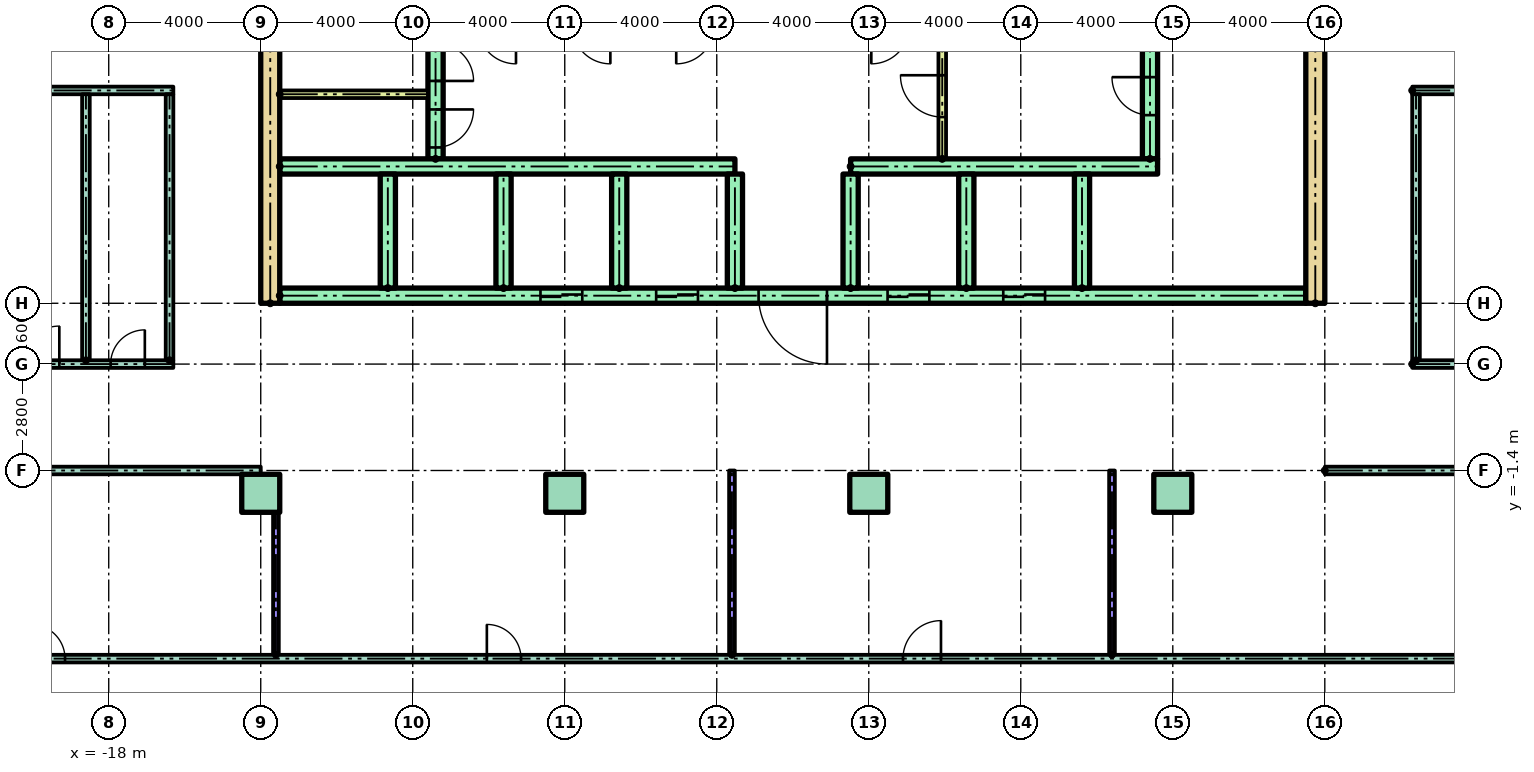
"""IFC4 building model, lengths in metres.
Left out: names, types, materials, properties, quantities, classifications, styles, units other than length and angle.
Written with IfcOpenShell. Run it as: python <this file> out.ifc"""

import sys

from ifc_helpers import new_model, si_unit, direction, frame, frame_2d, origin, origin_2d, place, context, subcontext, project, spatial, rectangle, extrude, element, fill, save


model = new_model("IFC4")
c1 = context("Model", 3, precision=1e-05, world=origin(), true_north=direction((0.0, 1.0)))
c2 = subcontext(c1, "Body", "Model", "MODEL_VIEW")
j1 = project(units=[si_unit("LENGTHUNIT", "METRE"), si_unit("PLANEANGLEUNIT", "RADIAN")], contexts=[c1])
p1 = place(None, origin())
s1 = spatial("IfcSite", under=j1, at=p1, CompositionType="ELEMENT")
p2 = place(p1, origin())
s2 = spatial("IfcBuilding", under=s1, at=p2, CompositionType="ELEMENT")
p3 = place(p2, frame((0.0, 0.0, 22.0)))
s3 = spatial("IfcBuildingStorey", under=s2, at=p3, CompositionType="ELEMENT", Elevation=22.0)
for number, where in (
    (1, (-14.0, -2.0, 0.0)),
    (2, (-6.0, -2.0, 0.0)),
    (3, (2.0, -2.0, 0.0)),
    (4, (10.0, -2.0, 0.0)),
):
    element("IfcColumn", number, at=place(p3, frame(where)), inside=s3, PredefinedType="COLUMN", context=c2, shape_type="SweptSolid", body=[
        extrude(rectangle(XDim=1.0, YDim=1.0, at=origin_2d()), origin(), (0.0, 0.0, 1.0), 4.0),
    ])
for number, where, z_axis, x_axis in (
    (5, (-13.75, 3.0, 0.0), (0.0, 0.0, 1.0), (0.0, 1.0, 0.0)),
    (6, (13.75, 3.0, 0.0), (0.0, 0.0, 1.0), (0.0, 1.0, 0.0)),
):
    element("IfcWall", number, at=place(p3, frame(where, z_axis=z_axis, x_axis=x_axis)), inside=s3, PredefinedType="SHEAR", context=c2, shape_type="SweptSolid", body=[
        extrude(rectangle(XDim=17.0, YDim=0.5, at=frame_2d((8.5, 0.0))), origin(), (0.0, 0.0, 1.0), 3.2),
    ])
p4 = place(p3, frame((-9.4, 6.8, 0.0), z_axis=(0.0, 0.0, 1.0), x_axis=(0.0, 1.0, 0.0)))
e7 = element("IfcWall", 7, at=p4, inside=s3, PredefinedType="SHEAR", context=c2, shape_type="SweptSolid", body=[
    extrude(rectangle(XDim=12.7, YDim=0.4, at=frame_2d((6.35, 0.0))), origin(), (0.0, 0.0, 1.0), 3.2),
])
p5 = place(p4, frame((0.3, 0.0, 0.0)))
e8 = element("IfcOpeningElement", 8, at=p5, cuts=e7, PredefinedType="OPENING", context=c2, shape_type="SweptSolid", body=[
    extrude(rectangle(XDim=1.0, YDim=2.1, at=frame_2d((0.5, 1.05))), frame((0.0, 0.21, 0.0), z_axis=(0.0, -1.0, 0.0), x_axis=(1.0, 0.0, 0.0)), (0.0, 0.0, 1.0), 0.42),
])
p6 = place(p4, frame((2.05, 0.0, 0.0)))
e9 = element("IfcOpeningElement", 9, at=p6, cuts=e7, PredefinedType="OPENING", context=c2, shape_type="SweptSolid", body=[
    extrude(rectangle(XDim=1.0, YDim=2.1, at=frame_2d((0.5, 1.05))), frame((0.0, 0.21, 0.0), z_axis=(0.0, -1.0, 0.0), x_axis=(1.0, 0.0, 0.0)), (0.0, 0.0, 1.0), 0.42),
])
p7 = place(p4, frame((7.925, 0.0, 0.0)))
e10 = element("IfcOpeningElement", 10, at=p7, cuts=e7, PredefinedType="OPENING", context=c2, shape_type="SweptSolid", body=[
    extrude(rectangle(XDim=1.0, YDim=2.1, at=frame_2d((0.5, 1.05))), frame((0.0, 0.21, 0.0), z_axis=(0.0, -1.0, 0.0), x_axis=(1.0, 0.0, 0.0)), (0.0, 0.0, 1.0), 0.42),
])
p8 = place(p3, frame((9.4, 6.8, 0.0), z_axis=(0.0, 0.0, 1.0), x_axis=(0.0, 1.0, 0.0)))
e11 = element("IfcWall", 11, at=p8, inside=s3, PredefinedType="SHEAR", context=c2, shape_type="SweptSolid", body=[
    extrude(rectangle(XDim=12.7, YDim=0.4, at=frame_2d((6.35, 0.0))), origin(), (0.0, 0.0, 1.0), 3.2),
])
p9 = place(p8, frame((1.15, 0.0, 0.0)))
e12 = element("IfcOpeningElement", 12, at=p9, cuts=e11, PredefinedType="OPENING", context=c2, shape_type="SweptSolid", body=[
    extrude(rectangle(XDim=1.0, YDim=2.1, at=frame_2d((0.5, 1.05))), frame((0.0, 0.21, 0.0), z_axis=(0.0, -1.0, 0.0), x_axis=(1.0, 0.0, 0.0)), (0.0, 0.0, 1.0), 0.42),
])
p10 = place(p8, frame((7.925, 0.0, 0.0)))
e13 = element("IfcOpeningElement", 13, at=p10, cuts=e11, PredefinedType="OPENING", context=c2, shape_type="SweptSolid", body=[
    extrude(rectangle(XDim=1.0, YDim=2.1, at=frame_2d((0.5, 1.05))), frame((0.0, 0.21, 0.0), z_axis=(0.0, -1.0, 0.0), x_axis=(1.0, 0.0, 0.0)), (0.0, 0.0, 1.0), 0.42),
])
p11 = place(p3, frame((-13.5, 3.2, 0.0)))
e14 = element("IfcWall", 14, at=p11, inside=s3, PredefinedType="SHEAR", context=c2, shape_type="SweptSolid", body=[
    extrude(rectangle(XDim=27.0, YDim=0.4, at=frame_2d((13.5, 0.0))), origin(), (0.0, 0.0, 1.0), 3.2),
])
p12 = place(p11, frame((6.861, 0.0, 0.0)))
e15 = element("IfcOpeningElement", 15, at=p12, cuts=e14, PredefinedType="OPENING", context=c2, shape_type="SweptSolid", body=[
    extrude(rectangle(XDim=1.1, YDim=2.1, at=frame_2d((0.55, 1.05))), frame((0.0, 0.21, 0.0), z_axis=(0.0, -1.0, 0.0), x_axis=(1.0, 0.0, 0.0)), (0.0, 0.0, 1.0), 0.42),
])
p13 = place(p11, frame((9.906, 0.0, 0.0)))
e16 = element("IfcOpeningElement", 16, at=p13, cuts=e14, PredefinedType="OPENING", context=c2, shape_type="SweptSolid", body=[
    extrude(rectangle(XDim=1.1, YDim=2.1, at=frame_2d((0.55, 1.05))), frame((0.0, 0.21, 0.0), z_axis=(0.0, -1.0, 0.0), x_axis=(1.0, 0.0, 0.0)), (0.0, 0.0, 1.0), 0.42),
])
p14 = place(p11, frame((15.994, 0.0, 0.0)))
e17 = element("IfcOpeningElement", 17, at=p14, cuts=e14, PredefinedType="OPENING", context=c2, shape_type="SweptSolid", body=[
    extrude(rectangle(XDim=1.1, YDim=2.1, at=frame_2d((0.55, 1.05))), frame((0.0, 0.21, 0.0), z_axis=(0.0, -1.0, 0.0), x_axis=(1.0, 0.0, 0.0)), (0.0, 0.0, 1.0), 0.42),
])
p15 = place(p11, frame((19.039, 0.0, 0.0)))
e18 = element("IfcOpeningElement", 18, at=p15, cuts=e14, PredefinedType="OPENING", context=c2, shape_type="SweptSolid", body=[
    extrude(rectangle(XDim=1.1, YDim=2.1, at=frame_2d((0.55, 1.05))), frame((0.0, 0.21, 0.0), z_axis=(0.0, -1.0, 0.0), x_axis=(1.0, 0.0, 0.0)), (0.0, 0.0, 1.0), 0.42),
])
p16 = place(p11, frame((12.6, 0.0, 0.0)))
e19 = element("IfcOpeningElement", 19, at=p16, cuts=e14, PredefinedType="OPENING", context=c2, shape_type="SweptSolid", body=[
    extrude(rectangle(XDim=1.8, YDim=2.1, at=frame_2d((0.9, 1.05))), frame((0.0, 0.21, 0.0), z_axis=(0.0, -1.0, 0.0), x_axis=(1.0, 0.0, 0.0)), (0.0, 0.0, 1.0), 0.42),
])
p17 = place(p3, frame((-13.5, 6.6, 0.0)))
e20 = element("IfcWall", 20, at=p17, inside=s3, PredefinedType="SHEAR", context=c2, shape_type="SweptSolid", body=[
    extrude(rectangle(XDim=11.978, YDim=0.4, at=frame_2d((5.989, 0.0))), origin(), (0.0, 0.0, 1.0), 3.2),
])
p18 = place(p3, frame((1.522, 6.6, 0.0)))
e21 = element("IfcWall", 21, at=p18, inside=s3, PredefinedType="SHEAR", context=c2, shape_type="SweptSolid", body=[
    extrude(rectangle(XDim=8.078, YDim=0.4, at=frame_2d((4.039, 0.0))), origin(), (0.0, 0.0, 1.0), 3.2),
])
for number, where, z_axis, x_axis in (
    (22, (-10.656, 3.4, 0.0), (0.0, 0.0, 1.0), (0.0, 1.0, 0.0)),
    (23, (-7.611, 3.4, 0.0), (0.0, 0.0, 1.0), (0.0, 1.0, 0.0)),
    (24, (-4.567, 3.4, 0.0), (0.0, 0.0, 1.0), (0.0, 1.0, 0.0)),
    (25, (-1.522, 3.4, 0.0), (0.0, 0.0, 1.0), (0.0, 1.0, 0.0)),
    (26, (1.522, 3.4, 0.0), (0.0, 0.0, 1.0), (0.0, 1.0, 0.0)),
    (27, (4.567, 3.4, 0.0), (0.0, 0.0, 1.0), (0.0, 1.0, 0.0)),
    (28, (7.611, 3.4, 0.0), (0.0, 0.0, 1.0), (0.0, 1.0, 0.0)),
):
    element("IfcWall", number, at=place(p3, frame(where, z_axis=z_axis, x_axis=x_axis)), inside=s3, PredefinedType="SHEAR", context=c2, shape_type="SweptSolid", body=[
        extrude(rectangle(XDim=3.0, YDim=0.4, at=frame_2d((1.5, 0.0))), origin(), (0.0, 0.0, 1.0), 3.2),
    ])
p19 = place(p3, frame((3.933, 6.8, 0.0), z_axis=(0.0, 0.0, 1.0), x_axis=(0.0, 1.0, 0.0)))
e29 = element("IfcWall", 29, at=p19, inside=s3, PredefinedType="PARTITIONING", context=c2, shape_type="SweptSolid", body=[
    extrude(rectangle(XDim=3.3, YDim=0.2, at=frame_2d((1.65, 0.0))), origin(), (0.0, 0.0, 1.0), 3.2),
])
p20 = place(p19, frame((1.1, 0.0, 0.0)))
e30 = element("IfcOpeningElement", 30, at=p20, cuts=e29, PredefinedType="OPENING", context=c2, shape_type="SweptSolid", body=[
    extrude(rectangle(XDim=1.1, YDim=2.1, at=frame_2d((0.55, 1.05))), frame((0.0, 0.11, 0.0), z_axis=(0.0, -1.0, 0.0), x_axis=(1.0, 0.0, 0.0)), (0.0, 0.0, 1.0), 0.22),
])
p21 = place(p3, frame((-13.5, 8.5, 0.0)))
e31 = element("IfcWall", 31, at=p21, inside=s3, PredefinedType="PARTITIONING", context=c2, shape_type="SweptSolid", body=[
    extrude(rectangle(XDim=3.9, YDim=0.2, at=frame_2d((1.95, 0.0))), origin(), (0.0, 0.0, 1.0), 3.2),
])
p22 = place(p3, frame((-37.6, -6.35, 0.0)))
e32 = element("IfcWall", 32, at=p22, inside=s3, PredefinedType="PARTITIONING", context=c2, shape_type="SweptSolid", body=[
    extrude(rectangle(XDim=75.2, YDim=0.2, at=frame_2d((37.6, 0.0))), origin(), (0.0, 0.0, 1.0), 3.2),
])
p23 = place(p22, frame((5.5, 0.0, 0.0)))
e33 = element("IfcOpeningElement", 33, at=p23, cuts=e32, PredefinedType="OPENING", context=c2, shape_type="SweptSolid", body=[
    extrude(rectangle(XDim=1.0, YDim=2.1, at=frame_2d((0.5, 1.05))), frame((0.0, 0.11, 0.0), z_axis=(0.0, -1.0, 0.0), x_axis=(1.0, 0.0, 0.0)), (0.0, 0.0, 1.0), 0.22),
])
p24 = place(p22, frame((17.55, 0.0, 0.0)))
e34 = element("IfcOpeningElement", 34, at=p24, cuts=e32, PredefinedType="OPENING", context=c2, shape_type="SweptSolid", body=[
    extrude(rectangle(XDim=0.9, YDim=2.1, at=frame_2d((0.45, 1.05))), frame((0.0, 0.11, 0.0), z_axis=(0.0, -1.0, 0.0), x_axis=(1.0, 0.0, 0.0)), (0.0, 0.0, 1.0), 0.22),
])
p25 = place(p22, frame((29.55, 0.0, 0.0)))
e35 = element("IfcOpeningElement", 35, at=p25, cuts=e32, PredefinedType="OPENING", context=c2, shape_type="SweptSolid", body=[
    extrude(rectangle(XDim=0.9, YDim=2.1, at=frame_2d((0.45, 1.05))), frame((0.0, 0.11, 0.0), z_axis=(0.0, -1.0, 0.0), x_axis=(1.0, 0.0, 0.0)), (0.0, 0.0, 1.0), 0.22),
])
p26 = place(p22, frame((40.5, 0.0, 0.0)))
e36 = element("IfcOpeningElement", 36, at=p26, cuts=e32, PredefinedType="OPENING", context=c2, shape_type="SweptSolid", body=[
    extrude(rectangle(XDim=1.0, YDim=2.1, at=frame_2d((0.5, 1.05))), frame((0.0, 0.11, 0.0), z_axis=(0.0, -1.0, 0.0), x_axis=(1.0, 0.0, 0.0)), (0.0, 0.0, 1.0), 0.22),
])
p27 = place(p22, frame((60.1, 0.0, 0.0)))
e37 = element("IfcOpeningElement", 37, at=p27, cuts=e32, PredefinedType="OPENING", context=c2, shape_type="SweptSolid", body=[
    extrude(rectangle(XDim=1.0, YDim=2.1, at=frame_2d((0.5, 1.05))), frame((0.0, 0.11, 0.0), z_axis=(0.0, -1.0, 0.0), x_axis=(1.0, 0.0, 0.0)), (0.0, 0.0, 1.0), 0.22),
])
for number, where in (
    (38, (-36.9, -1.4, 0.0)),
    (39, (14.0, -1.4, 0.0)),
):
    element("IfcWall", number, at=place(p3, frame(where)), inside=s3, PredefinedType="PARTITIONING", context=c2, shape_type="SweptSolid", body=[
        extrude(rectangle(XDim=22.9, YDim=0.2, at=frame_2d((11.45, 0.0))), origin(), (0.0, 0.0, 1.0), 3.2),
    ])
p28 = place(p3, frame((-36.9, 1.4, 0.0)))
e40 = element("IfcWall", 40, at=p28, inside=s3, PredefinedType="PARTITIONING", context=c2, shape_type="SweptSolid", body=[
    extrude(rectangle(XDim=20.6, YDim=0.2, at=frame_2d((10.3, 0.0))), origin(), (0.0, 0.0, 1.0), 3.2),
])
p29 = place(p28, frame((7.9, 0.0, 0.0)))
e41 = element("IfcOpeningElement", 41, at=p29, cuts=e40, PredefinedType="OPENING", context=c2, shape_type="SweptSolid", body=[
    extrude(rectangle(XDim=1.0, YDim=2.1, at=frame_2d((0.5, 1.05))), frame((0.0, 0.11, 0.0), z_axis=(0.0, -1.0, 0.0), x_axis=(1.0, 0.0, 0.0)), (0.0, 0.0, 1.0), 0.22),
])
p30 = place(p28, frame((12.9, 0.0, 0.0)))
e42 = element("IfcOpeningElement", 42, at=p30, cuts=e40, PredefinedType="OPENING", context=c2, shape_type="SweptSolid", body=[
    extrude(rectangle(XDim=1.0, YDim=2.1, at=frame_2d((0.5, 1.05))), frame((0.0, 0.11, 0.0), z_axis=(0.0, -1.0, 0.0), x_axis=(1.0, 0.0, 0.0)), (0.0, 0.0, 1.0), 0.22),
])
p31 = place(p28, frame((16.6, 0.0, 0.0)))
e43 = element("IfcOpeningElement", 43, at=p31, cuts=e40, PredefinedType="OPENING", context=c2, shape_type="SweptSolid", body=[
    extrude(rectangle(XDim=1.0, YDim=2.1, at=frame_2d((0.5, 1.05))), frame((0.0, 0.11, 0.0), z_axis=(0.0, -1.0, 0.0), x_axis=(1.0, 0.0, 0.0)), (0.0, 0.0, 1.0), 0.22),
])
p32 = place(p28, frame((18.95, 0.0, 0.0)))
e44 = element("IfcOpeningElement", 44, at=p32, cuts=e40, PredefinedType="OPENING", context=c2, shape_type="SweptSolid", body=[
    extrude(rectangle(XDim=0.9, YDim=2.1, at=frame_2d((0.45, 1.05))), frame((0.0, 0.11, 0.0), z_axis=(0.0, -1.0, 0.0), x_axis=(1.0, 0.0, 0.0)), (0.0, 0.0, 1.0), 0.22),
])
p33 = place(p3, frame((16.3, 1.4, 0.0)))
e45 = element("IfcWall", 45, at=p33, inside=s3, PredefinedType="PARTITIONING", context=c2, shape_type="SweptSolid", body=[
    extrude(rectangle(XDim=20.6, YDim=0.2, at=frame_2d((10.3, 0.0))), origin(), (0.0, 0.0, 1.0), 3.2),
])
p34 = place(p33, frame((2.35, 0.0, 0.0)))
e46 = element("IfcOpeningElement", 46, at=p34, cuts=e45, PredefinedType="OPENING", context=c2, shape_type="SweptSolid", body=[
    extrude(rectangle(XDim=1.0, YDim=2.1, at=frame_2d((0.5, 1.05))), frame((0.0, 0.11, 0.0), z_axis=(0.0, -1.0, 0.0), x_axis=(1.0, 0.0, 0.0)), (0.0, 0.0, 1.0), 0.22),
])
p35 = place(p33, frame((7.1, 0.0, 0.0)))
e47 = element("IfcOpeningElement", 47, at=p35, cuts=e45, PredefinedType="OPENING", context=c2, shape_type="SweptSolid", body=[
    extrude(rectangle(XDim=1.0, YDim=2.1, at=frame_2d((0.5, 1.05))), frame((0.0, 0.11, 0.0), z_axis=(0.0, -1.0, 0.0), x_axis=(1.0, 0.0, 0.0)), (0.0, 0.0, 1.0), 0.22),
])
p36 = place(p33, frame((10.8, 0.0, 0.0)))
e48 = element("IfcOpeningElement", 48, at=p36, cuts=e45, PredefinedType="OPENING", context=c2, shape_type="SweptSolid", body=[
    extrude(rectangle(XDim=1.0, YDim=2.1, at=frame_2d((0.5, 1.05))), frame((0.0, 0.11, 0.0), z_axis=(0.0, -1.0, 0.0), x_axis=(1.0, 0.0, 0.0)), (0.0, 0.0, 1.0), 0.22),
])
p37 = place(p33, frame((13.15, 0.0, 0.0)))
e49 = element("IfcOpeningElement", 49, at=p37, cuts=e45, PredefinedType="OPENING", context=c2, shape_type="SweptSolid", body=[
    extrude(rectangle(XDim=0.9, YDim=2.1, at=frame_2d((0.45, 1.05))), frame((0.0, 0.11, 0.0), z_axis=(0.0, -1.0, 0.0), x_axis=(1.0, 0.0, 0.0)), (0.0, 0.0, 1.0), 0.22),
])
for number, where in (
    (50, (-37.6, 8.6, 0.0)),
    (51, (16.3, 8.6, 0.0)),
):
    element("IfcWall", number, at=place(p3, frame(where)), inside=s3, PredefinedType="PARTITIONING", context=c2, shape_type="SweptSolid", body=[
        extrude(rectangle(XDim=21.3, YDim=0.2, at=frame_2d((10.65, 0.0))), origin(), (0.0, 0.0, 1.0), 3.2),
    ])
for number, where, z_axis, x_axis in (
    (52, (-18.6, 1.5, 0.0), (0.0, 0.0, 1.0), (0.0, 1.0, 0.0)),
    (53, (-16.4, 1.5, 0.0), (0.0, 0.0, 1.0), (0.0, 1.0, 0.0)),
):
    element("IfcWall", number, at=place(p3, frame(where, z_axis=z_axis, x_axis=x_axis)), inside=s3, PredefinedType="PARTITIONING", context=c2, shape_type="SweptSolid", body=[
        extrude(rectangle(XDim=7.0, YDim=0.2, at=frame_2d((3.5, 0.0))), origin(), (0.0, 0.0, 1.0), 3.2),
    ])
p38 = place(p3, frame((-13.6, -6.25, 0.0), z_axis=(0.0, 0.0, 1.0), x_axis=(0.0, 1.0, 0.0)))
e54 = element("IfcWall", 54, at=p38, inside=s3, PredefinedType="PARTITIONING", context=c2, shape_type="SweptSolid", body=[
    extrude(rectangle(XDim=3.75, YDim=0.15, at=frame_2d((1.875, 0.0))), origin(), (0.0, 0.0, 1.0), 3.2),
])
for number, where, z_axis, x_axis in (
    (55, (-1.6, -6.25, 0.0), (0.0, 0.0, 1.0), (0.0, 1.0, 0.0)),
    (56, (8.4, -6.25, 0.0), (0.0, 0.0, 1.0), (0.0, 1.0, 0.0)),
):
    element("IfcWall", number, at=place(p3, frame(where, z_axis=z_axis, x_axis=x_axis)), inside=s3, PredefinedType="PARTITIONING", context=c2, shape_type="SweptSolid", body=[
        extrude(rectangle(XDim=4.85, YDim=0.15, at=frame_2d((2.425, 0.0))), origin(), (0.0, 0.0, 1.0), 3.2),
    ])
p39 = place(p3, frame((16.4, 1.5, 0.0), z_axis=(0.0, 0.0, 1.0), x_axis=(0.0, 1.0, 0.0)))
e57 = element("IfcWall", 57, at=p39, inside=s3, PredefinedType="PARTITIONING", context=c2, shape_type="SweptSolid", body=[
    extrude(rectangle(XDim=7.0, YDim=0.2, at=frame_2d((3.5, 0.0))), origin(), (0.0, 0.0, 1.0), 3.2),
])
p40 = place(p12, origin())
e58 = element("IfcDoor", 58, at=p40, inside=s3, OperationType="SLIDING_TO_LEFT", PredefinedType="DOOR", context=c2, shape_type="SweptSolid", body=[
    extrude(rectangle(XDim=1.1, YDim=2.1, at=frame_2d((0.55, 1.05))), frame((0.0, 0.025, 0.0), z_axis=(0.0, -1.0, 0.0), x_axis=(1.0, 0.0, 0.0)), (0.0, 0.0, 1.0), 0.05),
])
fill(e15, e58)
p41 = place(p13, origin())
e59 = element("IfcDoor", 59, at=p41, inside=s3, OperationType="SLIDING_TO_LEFT", PredefinedType="DOOR", context=c2, shape_type="SweptSolid", body=[
    extrude(rectangle(XDim=1.1, YDim=2.1, at=frame_2d((0.55, 1.05))), frame((0.0, 0.025, 0.0), z_axis=(0.0, -1.0, 0.0), x_axis=(1.0, 0.0, 0.0)), (0.0, 0.0, 1.0), 0.05),
])
fill(e16, e59)
p42 = place(p14, origin())
e60 = element("IfcDoor", 60, at=p42, inside=s3, OperationType="SLIDING_TO_LEFT", PredefinedType="DOOR", context=c2, shape_type="SweptSolid", body=[
    extrude(rectangle(XDim=1.1, YDim=2.1, at=frame_2d((0.55, 1.05))), frame((0.0, 0.025, 0.0), z_axis=(0.0, -1.0, 0.0), x_axis=(1.0, 0.0, 0.0)), (0.0, 0.0, 1.0), 0.05),
])
fill(e17, e60)
p43 = place(p15, origin())
e61 = element("IfcDoor", 61, at=p43, inside=s3, OperationType="SLIDING_TO_LEFT", PredefinedType="DOOR", context=c2, shape_type="SweptSolid", body=[
    extrude(rectangle(XDim=1.1, YDim=2.1, at=frame_2d((0.55, 1.05))), frame((0.0, 0.025, 0.0), z_axis=(0.0, -1.0, 0.0), x_axis=(1.0, 0.0, 0.0)), (0.0, 0.0, 1.0), 0.05),
])
fill(e18, e61)
p44 = place(p16, frame((1.8, 0.0, 0.0), z_axis=(0.0, 0.0, 1.0), x_axis=(-1.0, 0.0, 0.0)))
e62 = element("IfcDoor", 62, at=p44, inside=s3, OperationType="DOUBLE_DOOR_SINGLE_SWING", PredefinedType="DOOR", context=c2, shape_type="SweptSolid", body=[
    extrude(rectangle(XDim=1.8, YDim=2.1, at=frame_2d((0.9, 1.05))), frame((0.0, 0.025, 0.0), z_axis=(0.0, -1.0, 0.0), x_axis=(1.0, 0.0, 0.0)), (0.0, 0.0, 1.0), 0.05),
])
fill(e19, e62)
p45 = place(p20, origin())
e63 = element("IfcDoor", 63, at=p45, inside=s3, OperationType="SINGLE_SWING_RIGHT", PredefinedType="DOOR", context=c2, shape_type="SweptSolid", body=[
    extrude(rectangle(XDim=1.1, YDim=2.1, at=frame_2d((0.55, 1.05))), frame((0.0, 0.025, 0.0), z_axis=(0.0, -1.0, 0.0), x_axis=(1.0, 0.0, 0.0)), (0.0, 0.0, 1.0), 0.05),
])
fill(e30, e63)
p46 = place(p5, frame((1.0, 0.0, 0.0), z_axis=(0.0, 0.0, 1.0), x_axis=(-1.0, 0.0, 0.0)))
e64 = element("IfcDoor", 64, at=p46, inside=s3, OperationType="SINGLE_SWING_RIGHT", PredefinedType="DOOR", context=c2, shape_type="SweptSolid", body=[
    extrude(rectangle(XDim=1.0, YDim=2.1, at=frame_2d((0.5, 1.05))), frame((0.0, 0.025, 0.0), z_axis=(0.0, -1.0, 0.0), x_axis=(1.0, 0.0, 0.0)), (0.0, 0.0, 1.0), 0.05),
])
fill(e8, e64)
p47 = place(p6, frame((1.0, 0.0, 0.0), z_axis=(0.0, 0.0, 1.0), x_axis=(-1.0, 0.0, 0.0)))
e65 = element("IfcDoor", 65, at=p47, inside=s3, OperationType="SINGLE_SWING_LEFT", PredefinedType="DOOR", context=c2, shape_type="SweptSolid", body=[
    extrude(rectangle(XDim=1.0, YDim=2.1, at=frame_2d((0.5, 1.05))), frame((0.0, 0.025, 0.0), z_axis=(0.0, -1.0, 0.0), x_axis=(1.0, 0.0, 0.0)), (0.0, 0.0, 1.0), 0.05),
])
fill(e9, e65)
p48 = place(p9, origin())
e66 = element("IfcDoor", 66, at=p48, inside=s3, OperationType="SINGLE_SWING_RIGHT", PredefinedType="DOOR", context=c2, shape_type="SweptSolid", body=[
    extrude(rectangle(XDim=1.0, YDim=2.1, at=frame_2d((0.5, 1.05))), frame((0.0, 0.025, 0.0), z_axis=(0.0, -1.0, 0.0), x_axis=(1.0, 0.0, 0.0)), (0.0, 0.0, 1.0), 0.05),
])
fill(e12, e66)
p49 = place(p24, origin())
e67 = element("IfcDoor", 67, at=p49, inside=s3, OperationType="SINGLE_SWING_LEFT", PredefinedType="DOOR", context=c2, shape_type="SweptSolid", body=[
    extrude(rectangle(XDim=0.9, YDim=2.1, at=frame_2d((0.45, 1.05))), frame((0.0, 0.025, 0.0), z_axis=(0.0, -1.0, 0.0), x_axis=(1.0, 0.0, 0.0)), (0.0, 0.0, 1.0), 0.05),
])
fill(e34, e67)
p50 = place(p25, origin())
e68 = element("IfcDoor", 68, at=p50, inside=s3, OperationType="SINGLE_SWING_LEFT", PredefinedType="DOOR", context=c2, shape_type="SweptSolid", body=[
    extrude(rectangle(XDim=0.9, YDim=2.1, at=frame_2d((0.45, 1.05))), frame((0.0, 0.025, 0.0), z_axis=(0.0, -1.0, 0.0), x_axis=(1.0, 0.0, 0.0)), (0.0, 0.0, 1.0), 0.05),
])
fill(e35, e68)
p51 = place(p26, origin())
e69 = element("IfcDoor", 69, at=p51, inside=s3, OperationType="SINGLE_SWING_RIGHT", PredefinedType="DOOR", context=c2, shape_type="SweptSolid", body=[
    extrude(rectangle(XDim=1.0, YDim=2.1, at=frame_2d((0.5, 1.05))), frame((0.0, 0.025, 0.0), z_axis=(0.0, -1.0, 0.0), x_axis=(1.0, 0.0, 0.0)), (0.0, 0.0, 1.0), 0.05),
])
fill(e36, e69)
p52 = place(p31, origin())
e70 = element("IfcDoor", 70, at=p52, inside=s3, OperationType="SINGLE_SWING_RIGHT", PredefinedType="DOOR", context=c2, shape_type="SweptSolid", body=[
    extrude(rectangle(XDim=1.0, YDim=2.1, at=frame_2d((0.5, 1.05))), frame((0.0, 0.025, 0.0), z_axis=(0.0, -1.0, 0.0), x_axis=(1.0, 0.0, 0.0)), (0.0, 0.0, 1.0), 0.05),
])
fill(e43, e70)
p53 = place(p32, origin())
e71 = element("IfcDoor", 71, at=p53, inside=s3, OperationType="SINGLE_SWING_RIGHT", PredefinedType="DOOR", context=c2, shape_type="SweptSolid", body=[
    extrude(rectangle(XDim=0.9, YDim=2.1, at=frame_2d((0.45, 1.05))), frame((0.0, 0.025, 0.0), z_axis=(0.0, -1.0, 0.0), x_axis=(1.0, 0.0, 0.0)), (0.0, 0.0, 1.0), 0.05),
])
fill(e44, e71)
save(model, sys.argv[1])
